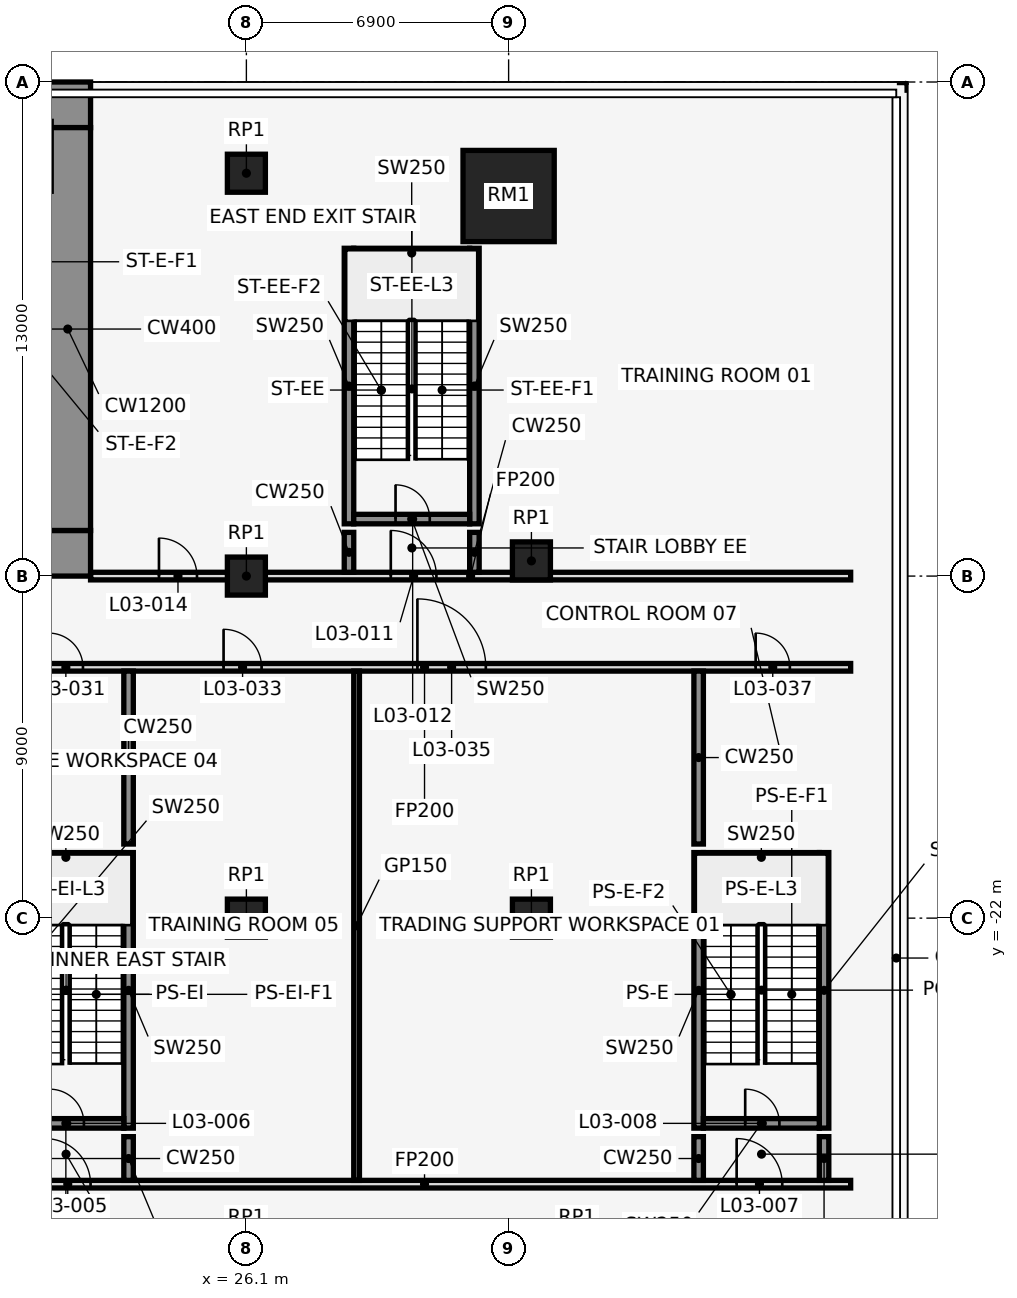
"""IFC4 building model, lengths in metres.
Left out: names, types, materials, properties, quantities, classifications, styles, units other than length and angle.
Written with IfcOpenShell. Run it as: python <this file> out.ifc"""

import sys

from ifc_helpers import new_model, si_unit, direction, frame, frame_2d, origin, origin_2d, place, context, subcontext, project, spatial, rectangle, extrude, element, fill, save


model = new_model("IFC4")
c1 = context("Model", 3, precision=1e-05, world=origin(), true_north=direction((0.0, 1.0)))
c2 = subcontext(c1, "Body", "Model", "MODEL_VIEW")
j1 = project(units=[si_unit("LENGTHUNIT", "METRE"), si_unit("PLANEANGLEUNIT", "RADIAN")], contexts=[c1])
p1 = place(None, origin())
s1 = spatial("IfcSite", under=j1, at=p1, CompositionType="ELEMENT")
p2 = place(p1, origin())
s2 = spatial("IfcBuilding", under=s1, at=p2, CompositionType="ELEMENT")
p3 = place(p2, frame((0.0, 0.0, 20.0)))
s3 = spatial("IfcBuildingStorey", under=s2, at=p3, CompositionType="ELEMENT", Elevation=20.0)
p4 = place(p3, frame((26.1, -2.4, 0.0), z_axis=(0.0, 0.0, 1.0), x_axis=(1.0, 0.0, 0.0)))
e1 = element("IfcColumn", 1, at=p4, inside=s3, PredefinedType="COLUMN", context=c2, shape_type="SweptSolid", body=[
    extrude(rectangle(XDim=1.0, YDim=1.0, at=origin_2d()), origin(), (0.0, 0.0, 1.0), 5.0),
])
p5 = place(p3, frame((33.0, -3.0, 0.0), z_axis=(0.0, 0.0, 1.0), x_axis=(1.0, 0.0, 0.0)))
e2 = element("IfcColumn", 2, at=p5, inside=s3, PredefinedType="COLUMN", context=c2, shape_type="SweptSolid", body=[
    extrude(rectangle(XDim=2.4, YDim=2.4, at=origin_2d()), origin(), (0.0, 0.0, 1.0), 5.0),
])
for number, where, z_axis, x_axis in (
    (3, (33.6, -12.6, 0.0), (0.0, 0.0, 1.0), (1.0, 0.0, 0.0)),
    (4, (33.6, -22.0, 0.0), (0.0, 0.0, 1.0), (1.0, 0.0, 0.0)),
    (5, (26.1, -22.0, 0.0), (0.0, 0.0, 1.0), (1.0, 0.0, 0.0)),
    (6, (26.1, -13.0, 0.0), (0.0, 0.0, 1.0), (1.0, 0.0, 0.0)),
):
    element("IfcColumn", number, at=place(p3, frame(where, z_axis=z_axis, x_axis=x_axis)), inside=s3, PredefinedType="COLUMN", context=c2, shape_type="SweptSolid", body=[
        extrude(rectangle(XDim=1.0, YDim=1.0, at=origin_2d()), origin(), (0.0, 0.0, 1.0), 5.0),
    ])
for number, where, z_axis, x_axis in (
    (7, (28.8, -11.625, 0.0), (0.0, 0.0, 1.0), (0.0, 1.0, 0.0)),
    (8, (32.1, -11.625, 0.0), (0.0, 0.0, 1.0), (0.0, 1.0, 0.0)),
):
    element("IfcWall", number, at=place(p3, frame(where, z_axis=z_axis, x_axis=x_axis)), inside=s3, PredefinedType="SHEAR", context=c2, shape_type="SweptSolid", body=[
        extrude(rectangle(XDim=7.25, YDim=0.25, at=frame_2d((3.625, 0.0))), origin(), (0.0, 0.0, 1.0), 5.0),
    ])
p6 = place(p3, frame((28.925, -11.5, 0.0), z_axis=(0.0, 0.0, 1.0), x_axis=(1.0, 0.0, 0.0)))
e9 = element("IfcWall", 9, at=p6, inside=s3, PredefinedType="SHEAR", context=c2, shape_type="SweptSolid", body=[
    extrude(rectangle(XDim=3.05, YDim=0.25, at=frame_2d((1.525, 0.0))), origin(), (0.0, 0.0, 1.0), 5.0),
])
p7 = place(p6, frame((1.1, 0.0, 0.0)))
e10 = element("IfcOpeningElement", 10, at=p7, cuts=e9, PredefinedType="OPENING", context=c2, shape_type="SweptSolid", body=[
    extrude(rectangle(XDim=0.9, YDim=2.1, at=frame_2d((0.45, 1.05))), frame((0.0, 0.137, 0.0), z_axis=(0.0, -1.0, 0.0), x_axis=(1.0, 0.0, 0.0)), (0.0, 0.0, 1.0), 0.274),
])
p8 = place(p3, frame((28.925, -4.5, 0.0), z_axis=(0.0, 0.0, 1.0), x_axis=(1.0, 0.0, 0.0)))
e11 = element("IfcWall", 11, at=p8, inside=s3, PredefinedType="SHEAR", context=c2, shape_type="SweptSolid", body=[
    extrude(rectangle(XDim=3.05, YDim=0.25, at=frame_2d((1.525, 0.0))), origin(), (0.0, 0.0, 1.0), 5.0),
])
p9 = place(p3, frame((23.0, -27.525, 0.0), z_axis=(0.0, 0.0, 1.0), x_axis=(0.0, 1.0, 0.0)))
e12 = element("IfcWall", 12, at=p9, inside=s3, PredefinedType="SHEAR", context=c2, shape_type="SweptSolid", body=[
    extrude(rectangle(XDim=7.25, YDim=0.25, at=frame_2d((3.625, 0.0))), origin(), (0.0, 0.0, 1.0), 5.0),
])
p10 = place(p3, frame((19.825, -27.4, 0.0), z_axis=(0.0, 0.0, 1.0), x_axis=(1.0, 0.0, 0.0)))
e13 = element("IfcWall", 13, at=p10, inside=s3, PredefinedType="SHEAR", context=c2, shape_type="SweptSolid", body=[
    extrude(rectangle(XDim=3.05, YDim=0.25, at=frame_2d((1.525, 0.0))), origin(), (0.0, 0.0, 1.0), 5.0),
])
p11 = place(p10, frame((1.1, 0.0, 0.0)))
e14 = element("IfcOpeningElement", 14, at=p11, cuts=e13, PredefinedType="OPENING", context=c2, shape_type="SweptSolid", body=[
    extrude(rectangle(XDim=0.9, YDim=2.1, at=frame_2d((0.45, 1.05))), frame((0.0, 0.137, 0.0), z_axis=(0.0, -1.0, 0.0), x_axis=(1.0, 0.0, 0.0)), (0.0, 0.0, 1.0), 0.274),
])
p12 = place(p3, frame((19.825, -20.4, 0.0), z_axis=(0.0, 0.0, 1.0), x_axis=(1.0, 0.0, 0.0)))
e15 = element("IfcWall", 15, at=p12, inside=s3, PredefinedType="SHEAR", context=c2, shape_type="SweptSolid", body=[
    extrude(rectangle(XDim=3.05, YDim=0.25, at=frame_2d((1.525, 0.0))), origin(), (0.0, 0.0, 1.0), 5.0),
])
for number, where, z_axis, x_axis in (
    (16, (38.0, -27.525, 0.0), (0.0, 0.0, 1.0), (0.0, 1.0, 0.0)),
    (17, (41.3, -27.525, 0.0), (0.0, 0.0, 1.0), (0.0, 1.0, 0.0)),
):
    element("IfcWall", number, at=place(p3, frame(where, z_axis=z_axis, x_axis=x_axis)), inside=s3, PredefinedType="SHEAR", context=c2, shape_type="SweptSolid", body=[
        extrude(rectangle(XDim=7.25, YDim=0.25, at=frame_2d((3.625, 0.0))), origin(), (0.0, 0.0, 1.0), 5.0),
    ])
p13 = place(p3, frame((38.125, -27.4, 0.0), z_axis=(0.0, 0.0, 1.0), x_axis=(1.0, 0.0, 0.0)))
e18 = element("IfcWall", 18, at=p13, inside=s3, PredefinedType="SHEAR", context=c2, shape_type="SweptSolid", body=[
    extrude(rectangle(XDim=3.05, YDim=0.25, at=frame_2d((1.525, 0.0))), origin(), (0.0, 0.0, 1.0), 5.0),
])
p14 = place(p13, frame((1.1, 0.0, 0.0)))
e19 = element("IfcOpeningElement", 19, at=p14, cuts=e18, PredefinedType="OPENING", context=c2, shape_type="SweptSolid", body=[
    extrude(rectangle(XDim=0.9, YDim=2.1, at=frame_2d((0.45, 1.05))), frame((0.0, 0.137, 0.0), z_axis=(0.0, -1.0, 0.0), x_axis=(1.0, 0.0, 0.0)), (0.0, 0.0, 1.0), 0.274),
])
p15 = place(p3, frame((38.125, -20.4, 0.0), z_axis=(0.0, 0.0, 1.0), x_axis=(1.0, 0.0, 0.0)))
e20 = element("IfcWall", 20, at=p15, inside=s3, PredefinedType="SHEAR", context=c2, shape_type="SweptSolid", body=[
    extrude(rectangle(XDim=3.05, YDim=0.25, at=frame_2d((1.525, 0.0))), origin(), (0.0, 0.0, 1.0), 5.0),
])
p16 = place(p3, frame((19.575, -29.0, 0.0), z_axis=(0.0, 0.0, 1.0), x_axis=(1.0, 0.0, 0.0)))
e21 = element("IfcWall", 21, at=p16, inside=s3, PredefinedType="PARTITIONING", context=c2, shape_type="SweptSolid", body=[
    extrude(rectangle(XDim=22.425, YDim=0.2, at=frame_2d((11.212, 0.0))), origin(), (0.0, 0.0, 1.0), 4.7),
])
p17 = place(p16, frame((1.225, 0.0, 0.0)))
e22 = element("IfcOpeningElement", 22, at=p17, cuts=e21, PredefinedType="OPENING", context=c2, shape_type="SweptSolid", body=[
    extrude(rectangle(XDim=1.2, YDim=2.1, at=frame_2d((0.6, 1.05))), frame((0.0, 0.112, 0.0), z_axis=(0.0, -1.0, 0.0), x_axis=(1.0, 0.0, 0.0)), (0.0, 0.0, 1.0), 0.224),
])
p18 = place(p16, frame((19.425, 0.0, 0.0)))
e23 = element("IfcOpeningElement", 23, at=p18, cuts=e21, PredefinedType="OPENING", context=c2, shape_type="SweptSolid", body=[
    extrude(rectangle(XDim=1.2, YDim=2.1, at=frame_2d((0.6, 1.05))), frame((0.0, 0.112, 0.0), z_axis=(0.0, -1.0, 0.0), x_axis=(1.0, 0.0, 0.0)), (0.0, 0.0, 1.0), 0.224),
])
p19 = place(p3, frame((19.575, -15.4, 0.0), z_axis=(0.0, 0.0, 1.0), x_axis=(1.0, 0.0, 0.0)))
e24 = element("IfcWall", 24, at=p19, inside=s3, PredefinedType="PARTITIONING", context=c2, shape_type="SweptSolid", body=[
    extrude(rectangle(XDim=22.425, YDim=0.2, at=frame_2d((11.212, 0.0))), origin(), (0.0, 0.0, 1.0), 4.7),
])
p20 = place(p19, frame((1.325, 0.0, 0.0)))
e25 = element("IfcOpeningElement", 25, at=p20, cuts=e24, PredefinedType="OPENING", context=c2, shape_type="SweptSolid", body=[
    extrude(rectangle(XDim=0.9, YDim=2.1, at=frame_2d((0.45, 1.05))), frame((0.0, 0.112, 0.0), z_axis=(0.0, -1.0, 0.0), x_axis=(1.0, 0.0, 0.0)), (0.0, 0.0, 1.0), 0.224),
])
p21 = place(p19, frame((5.925, 0.0, 0.0)))
e26 = element("IfcOpeningElement", 26, at=p21, cuts=e24, PredefinedType="OPENING", context=c2, shape_type="SweptSolid", body=[
    extrude(rectangle(XDim=1.0, YDim=2.1, at=frame_2d((0.5, 1.05))), frame((0.0, 0.112, 0.0), z_axis=(0.0, -1.0, 0.0), x_axis=(1.0, 0.0, 0.0)), (0.0, 0.0, 1.0), 0.224),
])
p22 = place(p19, frame((11.025, 0.0, 0.0)))
e27 = element("IfcOpeningElement", 27, at=p22, cuts=e24, PredefinedType="OPENING", context=c2, shape_type="SweptSolid", body=[
    extrude(rectangle(XDim=1.8, YDim=2.1, at=frame_2d((0.9, 1.05))), frame((0.0, 0.112, 0.0), z_axis=(0.0, -1.0, 0.0), x_axis=(1.0, 0.0, 0.0)), (0.0, 0.0, 1.0), 0.224),
])
p23 = place(p19, frame((19.925, 0.0, 0.0)))
e28 = element("IfcOpeningElement", 28, at=p23, cuts=e24, PredefinedType="OPENING", context=c2, shape_type="SweptSolid", body=[
    extrude(rectangle(XDim=0.9, YDim=2.1, at=frame_2d((0.45, 1.05))), frame((0.0, 0.112, 0.0), z_axis=(0.0, -1.0, 0.0), x_axis=(1.0, 0.0, 0.0)), (0.0, 0.0, 1.0), 0.224),
])
p24 = place(p3, frame((22.0, -13.0, 0.0), z_axis=(0.0, 0.0, 1.0), x_axis=(1.0, 0.0, 0.0)))
e29 = element("IfcWall", 29, at=p24, inside=s3, PredefinedType="PARTITIONING", context=c2, shape_type="SweptSolid", body=[
    extrude(rectangle(XDim=20.0, YDim=0.2, at=frame_2d((10.0, 0.0))), origin(), (0.0, 0.0, 1.0), 4.7),
])
p25 = place(p24, frame((7.9, 0.0, 0.0)))
e30 = element("IfcOpeningElement", 30, at=p25, cuts=e29, PredefinedType="OPENING", context=c2, shape_type="SweptSolid", body=[
    extrude(rectangle(XDim=1.2, YDim=2.1, at=frame_2d((0.6, 1.05))), frame((0.0, 0.112, 0.0), z_axis=(0.0, -1.0, 0.0), x_axis=(1.0, 0.0, 0.0)), (0.0, 0.0, 1.0), 0.224),
])
p26 = place(p24, frame((1.8, 0.0, 0.0)))
e31 = element("IfcOpeningElement", 31, at=p26, cuts=e29, PredefinedType="OPENING", context=c2, shape_type="SweptSolid", body=[
    extrude(rectangle(XDim=1.0, YDim=2.1, at=frame_2d((0.5, 1.05))), frame((0.0, 0.112, 0.0), z_axis=(0.0, -1.0, 0.0), x_axis=(1.0, 0.0, 0.0)), (0.0, 0.0, 1.0), 0.224),
])
p27 = place(p3, frame((23.0, -28.9, 0.0), z_axis=(0.0, 0.0, 1.0), x_axis=(0.0, 1.0, 0.0)))
e32 = element("IfcWall", 32, at=p27, inside=s3, PredefinedType="SHEAR", context=c2, shape_type="SweptSolid", body=[
    extrude(rectangle(XDim=1.15, YDim=0.25, at=frame_2d((0.575, 0.0))), origin(), (0.0, 0.0, 1.0), 5.0),
])
p28 = place(p3, frame((23.0, -20.05, 0.0), z_axis=(0.0, 0.0, 1.0), x_axis=(0.0, 1.0, 0.0)))
e33 = element("IfcWall", 33, at=p28, inside=s3, PredefinedType="SHEAR", context=c2, shape_type="SweptSolid", body=[
    extrude(rectangle(XDim=4.55, YDim=0.25, at=frame_2d((2.275, 0.0))), origin(), (0.0, 0.0, 1.0), 5.0),
])
p29 = place(p3, frame((28.8, -12.9, 0.0), z_axis=(0.0, 0.0, 1.0), x_axis=(0.0, 1.0, 0.0)))
e34 = element("IfcWall", 34, at=p29, inside=s3, PredefinedType="SHEAR", context=c2, shape_type="SweptSolid", body=[
    extrude(rectangle(XDim=1.05, YDim=0.25, at=frame_2d((0.525, 0.0))), origin(), (0.0, 0.0, 1.0), 5.0),
])
p30 = place(p3, frame((29.0, -28.9, 0.0), z_axis=(0.0, 0.0, 1.0), x_axis=(0.0, 1.0, 0.0)))
e35 = element("IfcWall", 35, at=p30, inside=s3, PredefinedType="PARTITIONING", context=c2, shape_type="SweptSolid", body=[
    extrude(rectangle(XDim=13.4, YDim=0.15, at=frame_2d((6.7, 0.0))), origin(), (0.0, 0.0, 1.0), 4.7),
])
p31 = place(p3, frame((32.1, -12.9, 0.0), z_axis=(0.0, 0.0, 1.0), x_axis=(0.0, 1.0, 0.0)))
e36 = element("IfcWall", 36, at=p31, inside=s3, PredefinedType="SHEAR", context=c2, shape_type="SweptSolid", body=[
    extrude(rectangle(XDim=1.05, YDim=0.25, at=frame_2d((0.525, 0.0))), origin(), (0.0, 0.0, 1.0), 5.0),
])
p32 = place(p3, frame((38.0, -28.9, 0.0), z_axis=(0.0, 0.0, 1.0), x_axis=(0.0, 1.0, 0.0)))
e37 = element("IfcWall", 37, at=p32, inside=s3, PredefinedType="SHEAR", context=c2, shape_type="SweptSolid", body=[
    extrude(rectangle(XDim=1.15, YDim=0.25, at=frame_2d((0.575, 0.0))), origin(), (0.0, 0.0, 1.0), 5.0),
])
p33 = place(p3, frame((38.0, -20.05, 0.0), z_axis=(0.0, 0.0, 1.0), x_axis=(0.0, 1.0, 0.0)))
e38 = element("IfcWall", 38, at=p33, inside=s3, PredefinedType="SHEAR", context=c2, shape_type="SweptSolid", body=[
    extrude(rectangle(XDim=4.55, YDim=0.25, at=frame_2d((2.275, 0.0))), origin(), (0.0, 0.0, 1.0), 5.0),
])
p34 = place(p3, frame((41.3, -28.9, 0.0), z_axis=(0.0, 0.0, 1.0), x_axis=(0.0, 1.0, 0.0)))
e39 = element("IfcWall", 39, at=p34, inside=s3, PredefinedType="SHEAR", context=c2, shape_type="SweptSolid", body=[
    extrude(rectangle(XDim=1.15, YDim=0.25, at=frame_2d((0.575, 0.0))), origin(), (0.0, 0.0, 1.0), 5.0),
])
p35 = place(p3, frame((-22.0, -0.6, 0.0), z_axis=(0.0, 0.0, 1.0), x_axis=(1.0, 0.0, 0.0)))
e40 = element("IfcWall", 40, at=p35, inside=s3, PredefinedType="SHEAR", context=c2, shape_type="SweptSolid", body=[
    extrude(rectangle(XDim=44.0, YDim=1.2, at=frame_2d((22.0, 0.0))), origin(), (0.0, 0.0, 1.0), 5.0),
])
p36 = place(p3, frame((-22.0, -12.4, 0.0), z_axis=(0.0, 0.0, 1.0), x_axis=(1.0, 0.0, 0.0)))
e41 = element("IfcWall", 41, at=p36, inside=s3, PredefinedType="SHEAR", context=c2, shape_type="SweptSolid", body=[
    extrude(rectangle(XDim=44.0, YDim=1.2, at=frame_2d((22.0, 0.0))), origin(), (0.0, 0.0, 1.0), 5.0),
])
p37 = place(p36, frame((2.2, 0.0, 0.0)))
e42 = element("IfcOpeningElement", 42, at=p37, cuts=e41, PredefinedType="OPENING", context=c2, shape_type="SweptSolid", body=[
    extrude(rectangle(XDim=1.2, YDim=2.1, at=frame_2d((0.6, 1.05))), frame((0.0, 0.612, 0.0), z_axis=(0.0, -1.0, 0.0), x_axis=(1.0, 0.0, 0.0)), (0.0, 0.0, 1.0), 1.224),
])
p38 = place(p36, frame((21.4, 0.0, 0.0)))
e43 = element("IfcOpeningElement", 43, at=p38, cuts=e41, PredefinedType="OPENING", context=c2, shape_type="SweptSolid", body=[
    extrude(rectangle(XDim=1.2, YDim=2.1, at=frame_2d((0.6, 1.05))), frame((0.0, 0.612, 0.0), z_axis=(0.0, -1.0, 0.0), x_axis=(1.0, 0.0, 0.0)), (0.0, 0.0, 1.0), 1.224),
])
p39 = place(p36, frame((40.6, 0.0, 0.0)))
e44 = element("IfcOpeningElement", 44, at=p39, cuts=e41, PredefinedType="OPENING", context=c2, shape_type="SweptSolid", body=[
    extrude(rectangle(XDim=1.2, YDim=2.1, at=frame_2d((0.6, 1.05))), frame((0.0, 0.612, 0.0), z_axis=(0.0, -1.0, 0.0), x_axis=(1.0, 0.0, 0.0)), (0.0, 0.0, 1.0), 1.224),
])
p40 = place(p36, frame((16.0, 0.0, 0.0)))
e45 = element("IfcOpeningElement", 45, at=p40, cuts=e41, PredefinedType="OPENING", context=c2, shape_type="SweptSolid", body=[
    extrude(rectangle(XDim=1.8, YDim=2.1, at=frame_2d((0.9, 1.05))), frame((0.0, 0.612, 0.0), z_axis=(0.0, -1.0, 0.0), x_axis=(1.0, 0.0, 0.0)), (0.0, 0.0, 1.0), 1.224),
])
p41 = place(p36, frame((6.3, 0.0, 0.0)))
e46 = element("IfcOpeningElement", 46, at=p41, cuts=e41, PredefinedType="OPENING", context=c2, shape_type="SweptSolid", body=[
    extrude(rectangle(XDim=1.2, YDim=2.1, at=frame_2d((0.6, 1.05))), frame((0.0, 0.612, 0.0), z_axis=(0.0, -1.0, 0.0), x_axis=(1.0, 0.0, 0.0)), (0.0, 0.0, 1.0), 1.224),
])
p42 = place(p36, frame((26.2, 0.0, 0.0)))
e47 = element("IfcOpeningElement", 47, at=p42, cuts=e41, PredefinedType="OPENING", context=c2, shape_type="SweptSolid", body=[
    extrude(rectangle(XDim=1.8, YDim=2.1, at=frame_2d((0.9, 1.05))), frame((0.0, 0.612, 0.0), z_axis=(0.0, -1.0, 0.0), x_axis=(1.0, 0.0, 0.0)), (0.0, 0.0, 1.0), 1.224),
])
p43 = place(p36, frame((36.5, 0.0, 0.0)))
e48 = element("IfcOpeningElement", 48, at=p43, cuts=e41, PredefinedType="OPENING", context=c2, shape_type="SweptSolid", body=[
    extrude(rectangle(XDim=1.2, YDim=2.1, at=frame_2d((0.6, 1.05))), frame((0.0, 0.612, 0.0), z_axis=(0.0, -1.0, 0.0), x_axis=(1.0, 0.0, 0.0)), (0.0, 0.0, 1.0), 1.224),
])
p44 = place(p3, frame((21.4, -11.8, 0.0), z_axis=(0.0, 0.0, 1.0), x_axis=(0.0, 1.0, 0.0)))
e49 = element("IfcWall", 49, at=p44, inside=s3, PredefinedType="SHEAR", context=c2, shape_type="SweptSolid", body=[
    extrude(rectangle(XDim=10.6, YDim=1.2, at=frame_2d((5.3, 0.0))), origin(), (0.0, 0.0, 1.0), 5.0),
])
p45 = place(p17, origin())
e50 = element("IfcDoor", 50, at=p45, inside=s3, OperationType="SINGLE_SWING_LEFT", PredefinedType="DOOR", context=c2, shape_type="SweptSolid", body=[
    extrude(rectangle(XDim=1.2, YDim=2.1, at=frame_2d((0.6, 1.05))), frame((0.0, 0.025, 0.0), z_axis=(0.0, -1.0, 0.0), x_axis=(1.0, 0.0, 0.0)), (0.0, 0.0, 1.0), 0.05),
])
fill(e22, e50)
p46 = place(p11, origin())
e51 = element("IfcDoor", 51, at=p46, inside=s3, OperationType="SINGLE_SWING_RIGHT", PredefinedType="DOOR", context=c2, shape_type="SweptSolid", body=[
    extrude(rectangle(XDim=0.9, YDim=2.1, at=frame_2d((0.45, 1.05))), frame((0.0, 0.025, 0.0), z_axis=(0.0, -1.0, 0.0), x_axis=(1.0, 0.0, 0.0)), (0.0, 0.0, 1.0), 0.05),
])
fill(e14, e51)
p47 = place(p18, origin())
e52 = element("IfcDoor", 52, at=p47, inside=s3, OperationType="SINGLE_SWING_LEFT", PredefinedType="DOOR", context=c2, shape_type="SweptSolid", body=[
    extrude(rectangle(XDim=1.2, YDim=2.1, at=frame_2d((0.6, 1.05))), frame((0.0, 0.025, 0.0), z_axis=(0.0, -1.0, 0.0), x_axis=(1.0, 0.0, 0.0)), (0.0, 0.0, 1.0), 0.05),
])
fill(e23, e52)
p48 = place(p14, origin())
e53 = element("IfcDoor", 53, at=p48, inside=s3, OperationType="SINGLE_SWING_LEFT", PredefinedType="DOOR", context=c2, shape_type="SweptSolid", body=[
    extrude(rectangle(XDim=0.9, YDim=2.1, at=frame_2d((0.45, 1.05))), frame((0.0, 0.025, 0.0), z_axis=(0.0, -1.0, 0.0), x_axis=(1.0, 0.0, 0.0)), (0.0, 0.0, 1.0), 0.05),
])
fill(e19, e53)
p49 = place(p25, origin())
e54 = element("IfcDoor", 54, at=p49, inside=s3, OperationType="SINGLE_SWING_LEFT", PredefinedType="DOOR", context=c2, shape_type="SweptSolid", body=[
    extrude(rectangle(XDim=1.2, YDim=2.1, at=frame_2d((0.6, 1.05))), frame((0.0, 0.025, 0.0), z_axis=(0.0, -1.0, 0.0), x_axis=(1.0, 0.0, 0.0)), (0.0, 0.0, 1.0), 0.05),
])
fill(e30, e54)
p50 = place(p7, origin())
e55 = element("IfcDoor", 55, at=p50, inside=s3, OperationType="SINGLE_SWING_RIGHT", PredefinedType="DOOR", context=c2, shape_type="SweptSolid", body=[
    extrude(rectangle(XDim=0.9, YDim=2.1, at=frame_2d((0.45, 1.05))), frame((0.0, 0.025, 0.0), z_axis=(0.0, -1.0, 0.0), x_axis=(1.0, 0.0, 0.0)), (0.0, 0.0, 1.0), 0.05),
])
fill(e10, e55)
p51 = place(p26, origin())
e56 = element("IfcDoor", 56, at=p51, inside=s3, OperationType="SINGLE_SWING_LEFT", PredefinedType="DOOR", context=c2, shape_type="SweptSolid", body=[
    extrude(rectangle(XDim=1.0, YDim=2.1, at=frame_2d((0.5, 1.05))), frame((0.0, 0.025, 0.0), z_axis=(0.0, -1.0, 0.0), x_axis=(1.0, 0.0, 0.0)), (0.0, 0.0, 1.0), 0.05),
])
fill(e31, e56)
p52 = place(p20, frame((0.9, 0.0, 0.0), z_axis=(0.0, 0.0, 1.0), x_axis=(-1.0, 0.0, 0.0)))
e57 = element("IfcDoor", 57, at=p52, inside=s3, OperationType="SINGLE_SWING_LEFT", PredefinedType="DOOR", context=c2, shape_type="SweptSolid", body=[
    extrude(rectangle(XDim=0.9, YDim=2.1, at=frame_2d((0.45, 1.05))), frame((0.0, 0.025, 0.0), z_axis=(0.0, -1.0, 0.0), x_axis=(1.0, 0.0, 0.0)), (0.0, 0.0, 1.0), 0.05),
])
fill(e25, e57)
p53 = place(p21, frame((1.0, 0.0, 0.0), z_axis=(0.0, 0.0, 1.0), x_axis=(-1.0, 0.0, 0.0)))
e58 = element("IfcDoor", 58, at=p53, inside=s3, OperationType="SINGLE_SWING_RIGHT", PredefinedType="DOOR", context=c2, shape_type="SweptSolid", body=[
    extrude(rectangle(XDim=1.0, YDim=2.1, at=frame_2d((0.5, 1.05))), frame((0.0, 0.025, 0.0), z_axis=(0.0, -1.0, 0.0), x_axis=(1.0, 0.0, 0.0)), (0.0, 0.0, 1.0), 0.05),
])
fill(e26, e58)
p54 = place(p22, origin())
e59 = element("IfcDoor", 59, at=p54, inside=s3, OperationType="SINGLE_SWING_LEFT", PredefinedType="DOOR", context=c2, shape_type="SweptSolid", body=[
    extrude(rectangle(XDim=1.8, YDim=2.1, at=frame_2d((0.9, 1.05))), frame((0.0, 0.025, 0.0), z_axis=(0.0, -1.0, 0.0), x_axis=(1.0, 0.0, 0.0)), (0.0, 0.0, 1.0), 0.05),
])
fill(e27, e59)
p55 = place(p23, frame((0.9, 0.0, 0.0), z_axis=(0.0, 0.0, 1.0), x_axis=(-1.0, 0.0, 0.0)))
e60 = element("IfcDoor", 60, at=p55, inside=s3, OperationType="SINGLE_SWING_LEFT", PredefinedType="DOOR", context=c2, shape_type="SweptSolid", body=[
    extrude(rectangle(XDim=0.9, YDim=2.1, at=frame_2d((0.45, 1.05))), frame((0.0, 0.025, 0.0), z_axis=(0.0, -1.0, 0.0), x_axis=(1.0, 0.0, 0.0)), (0.0, 0.0, 1.0), 0.05),
])
fill(e28, e60)
save(model, sys.argv[1])
